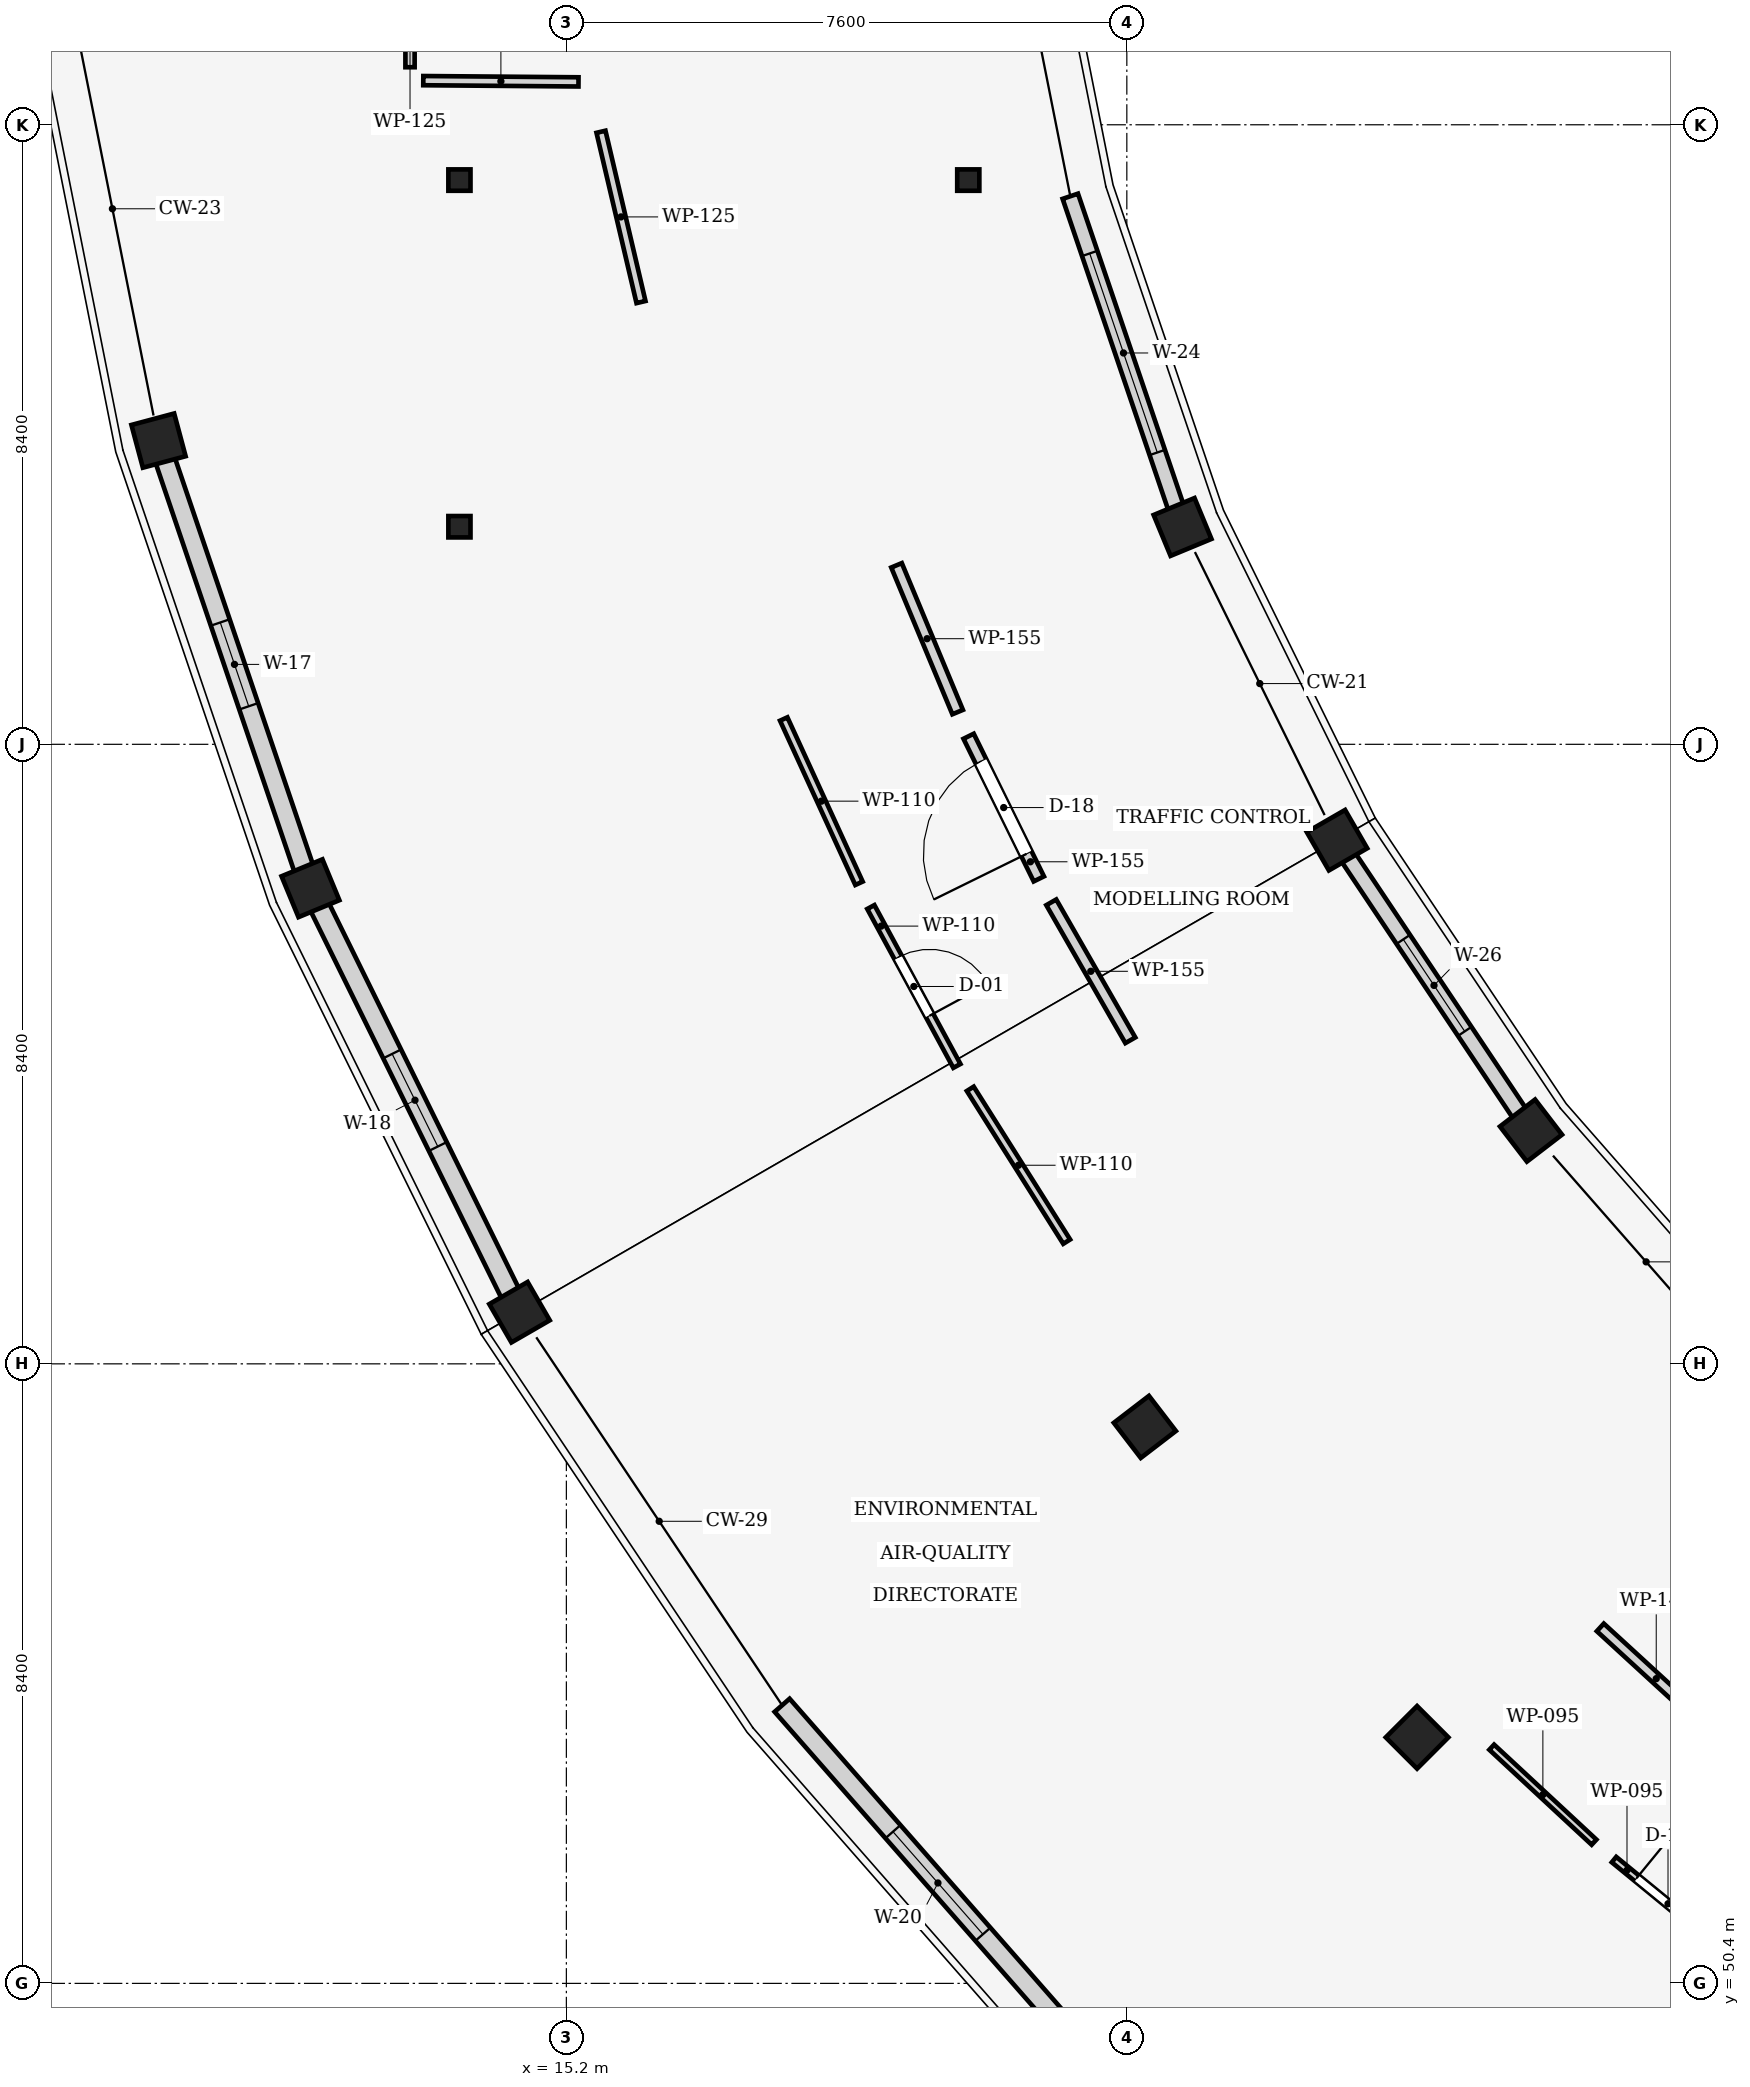
"""IFC4 building model, lengths in metres.
Left out: names, types, materials, properties, quantities, classifications, styles, units other than length and angle.
Written with IfcOpenShell. Run it as: python <this file> out.ifc"""

import sys

from ifc_helpers import new_model, si_unit, direction, frame, frame_2d, origin, origin_2d, place, context, subcontext, project, spatial, rectangle, i_section, extrude, element, fill, save


model = new_model("IFC4")
c1 = context("Model", 3, precision=1e-05, world=origin(), true_north=direction((0.0, 1.0)))
c2 = subcontext(c1, "Body", "Model", "MODEL_VIEW")
j1 = project(units=[si_unit("LENGTHUNIT", "METRE"), si_unit("PLANEANGLEUNIT", "RADIAN")], contexts=[c1])
p1 = place(None, origin())
s1 = spatial("IfcSite", under=j1, at=p1, CompositionType="ELEMENT")
p2 = place(p1, origin())
s2 = spatial("IfcBuilding", under=s1, at=p2, CompositionType="ELEMENT")
p3 = place(p2, frame((0.0, 0.0, 13.2)))
s3 = spatial("IfcBuildingStorey", under=s2, at=p3, CompositionType="ELEMENT", Elevation=13.2)
for number, where, z_axis, x_axis in (
    (1, (9.67, 71.318, 0.0), (0.0, 0.0, 1.0), (-0.966, -0.259, 0.0)),
    (2, (23.556, 70.147, 0.0), (0.0, 0.0, 1.0), (-0.924, -0.383, 0.0)),
    (3, (11.73, 65.249, 0.0), (0.0, 0.0, 1.0), (-0.924, -0.383, 0.0)),
    (4, (25.65, 65.9, 0.0), (0.0, 0.0, 1.0), (-0.866, -0.5, 0.0)),
    (5, (14.565, 59.5, 0.0), (0.0, 0.0, 1.0), (-0.866, -0.5, 0.0)),
    (6, (28.281, 61.963, 0.0), (0.0, 0.0, 1.0), (-0.793, -0.609, 0.0)),
    (7, (23.044, 57.945, 0.0), (0.0, 0.0, 1.0), (-0.793, -0.609, 0.0)),
    (8, (26.736, 53.736, 0.0), (0.0, 0.0, 1.0), (-0.707, -0.707, 0.0)),
):
    element("IfcColumn", number, at=place(p3, frame(where, z_axis=z_axis, x_axis=x_axis)), inside=s3, PredefinedType="COLUMN", context=c2, shape_type="SweptSolid", body=[
        extrude(rectangle(XDim=0.6, YDim=0.6, at=origin_2d()), origin(), (0.0, 0.0, 1.0), 4.05),
    ])
for number, where, z_axis, x_axis in (
    (9, (13.75, 70.15, 0.0), (0.0, 0.0, 1.0), (1.0, 0.0, 0.0)),
    (10, (20.65, 74.85, 0.0), (0.0, 0.0, 1.0), (1.0, 0.0, 0.0)),
    (11, (13.75, 74.85, 0.0), (0.0, 0.0, 1.0), (1.0, 0.0, 0.0)),
):
    element("IfcColumn", number, at=place(p3, frame(where, z_axis=z_axis, x_axis=x_axis)), inside=s3, PredefinedType="COLUMN", context=c2, shape_type="SweptSolid", body=[
        extrude(i_section(OverallWidth=0.3, OverallDepth=0.29, WebThickness=0.009, FlangeThickness=0.014, at=origin_2d()), origin(), (0.0, 0.0, 1.0), 4.05),
    ])
p4 = place(p3, frame((11.65, 65.483, 0.0), z_axis=(0.0, 0.0, 1.0), x_axis=(-0.321412703871, 0.946939213356, 0.0)))
e12 = element("IfcWall", 12, at=p4, inside=s3, PredefinedType="STANDARD", context=c2, shape_type="SweptSolid", body=[
    extrude(rectangle(XDim=5.913, YDim=0.27, at=frame_2d((2.957, 0.0))), origin(), (0.0, 0.0, 1.0), 3.165),
])
p5 = place(p4, frame((2.357, 0.0, 0.85)))
e13 = element("IfcOpeningElement", 13, at=p5, cuts=e12, PredefinedType="OPENING", context=c2, shape_type="SweptSolid", body=[
    extrude(rectangle(XDim=1.2, YDim=1.65, at=frame_2d((0.6, 0.825))), frame((0.0, 0.145, 0.0), z_axis=(0.0, -1.0, 0.0), x_axis=(1.0, 0.0, 0.0)), (0.0, 0.0, 1.0), 0.29),
])
p6 = place(p3, frame((22.033, 74.631, 0.0), z_axis=(0.0, 0.0, 1.0), x_axis=(0.321446201736, -0.946927842758, 0.0)))
e14 = element("IfcWall", 14, at=p6, inside=s3, PredefinedType="STANDARD", context=c2, shape_type="SweptSolid", body=[
    extrude(rectangle(XDim=4.487, YDim=0.22, at=frame_2d((2.244, 0.0))), origin(), (0.0, 0.0, 1.0), 3.7),
])
p7 = place(p6, frame((0.819, 0.0, 0.85)))
e15 = element("IfcOpeningElement", 15, at=p7, cuts=e14, PredefinedType="OPENING", context=c2, shape_type="SweptSolid", body=[
    extrude(rectangle(XDim=2.85, YDim=1.65, at=frame_2d((1.425, 0.825))), frame((0.0, 0.12, 0.0), z_axis=(0.0, -1.0, 0.0), x_axis=(1.0, 0.0, 0.0)), (0.0, 0.0, 1.0), 0.24),
])
p8 = place(p3, frame((14.449, 59.735, 0.0), z_axis=(0.0, 0.0, 1.0), x_axis=(-0.442328593944, 0.89685306209, 0.0)))
e16 = element("IfcWall", 16, at=p8, inside=s3, PredefinedType="STANDARD", context=c2, shape_type="SweptSolid", body=[
    extrude(rectangle(XDim=5.885, YDim=0.27, at=frame_2d((2.943, 0.0))), origin(), (0.0, 0.0, 1.0), 3.165),
])
p9 = place(p8, frame((2.243, 0.0, 0.85)))
e17 = element("IfcOpeningElement", 17, at=p9, cuts=e16, PredefinedType="OPENING", context=c2, shape_type="SweptSolid", body=[
    extrude(rectangle(XDim=1.4, YDim=1.65, at=frame_2d((0.7, 0.825))), frame((0.0, 0.145, 0.0), z_axis=(0.0, -1.0, 0.0), x_axis=(1.0, 0.0, 0.0)), (0.0, 0.0, 1.0), 0.29),
])
p10 = place(p3, frame((25.807, 65.665, 0.0), z_axis=(0.0, 0.0, 1.0), x_axis=(0.555551087144, -0.831482404849, 0.0)))
e18 = element("IfcWall", 18, at=p10, inside=s3, PredefinedType="STANDARD", context=c2, shape_type="SweptSolid", body=[
    extrude(rectangle(XDim=4.17, YDim=0.22, at=frame_2d((2.085, 0.0))), origin(), (0.0, 0.0, 1.0), 3.015),
])
p11 = place(p10, frame((1.335, 0.0, 0.85)))
e19 = element("IfcOpeningElement", 19, at=p11, cuts=e18, PredefinedType="OPENING", context=c2, shape_type="SweptSolid", body=[
    extrude(rectangle(XDim=1.5, YDim=1.85, at=frame_2d((0.75, 0.925))), frame((0.0, 0.12, 0.0), z_axis=(0.0, -1.0, 0.0), x_axis=(1.0, 0.0, 0.0)), (0.0, 0.0, 1.0), 0.24),
])
p12 = place(p3, frame((22.352, 49.352, 0.0), z_axis=(0.0, 0.0, 1.0), x_axis=(-0.659350951881, 0.751835302612, 0.0)))
e20 = element("IfcWall", 20, at=p12, inside=s3, PredefinedType="STANDARD", context=c2, shape_type="SweptSolid", body=[
    extrude(rectangle(XDim=6.409, YDim=0.27, at=frame_2d((3.205, 0.0))), origin(), (0.0, 0.0, 1.0), 3.7),
])
p13 = place(p12, frame((2.28, 0.0, 0.85)))
e21 = element("IfcOpeningElement", 21, at=p13, cuts=e20, PredefinedType="OPENING", context=c2, shape_type="SweptSolid", body=[
    extrude(rectangle(XDim=1.85, YDim=1.65, at=frame_2d((0.925, 0.825))), frame((0.0, 0.145, 0.0), z_axis=(0.0, -1.0, 0.0), x_axis=(1.0, 0.0, 0.0)), (0.0, 0.0, 1.0), 0.29),
])
p14 = place(p3, frame((13.08, 78.922, 0.0), z_axis=(0.0, 0.0, 1.0), x_axis=(0.0, -1.0, 0.0)))
e22 = element("IfcWall", 22, at=p14, inside=s3, PredefinedType="PARTITIONING", context=c2, shape_type="SweptSolid", body=[
    extrude(rectangle(XDim=2.542, YDim=0.125, at=frame_2d((1.271, 0.0))), origin(), (0.0, 0.0, 1.0), 3.7),
])
p15 = place(p14, frame((0.371, 0.0, 0.0)))
e23 = element("IfcOpeningElement", 23, at=p15, cuts=e22, PredefinedType="OPENING", context=c2, shape_type="SweptSolid", body=[
    extrude(rectangle(XDim=1.8, YDim=2.22, at=frame_2d((0.9, 1.11))), frame((0.0, 0.073, 0.0), z_axis=(0.0, -1.0, 0.0), x_axis=(1.0, 0.0, 0.0)), (0.0, 0.0, 1.0), 0.145),
])
p16 = place(p3, frame((15.365, 76.181, 0.0), z_axis=(0.0, 0.0, 1.0), x_axis=(-0.999967029155, 0.008120381907, 0.0)))
e24 = element("IfcWall", 24, at=p16, inside=s3, PredefinedType="PARTITIONING", context=c2, shape_type="SweptSolid", body=[
    extrude(rectangle(XDim=2.104, YDim=0.125, at=frame_2d((1.052, 0.0))), origin(), (0.0, 0.0, 1.0), 3.7),
])
p17 = place(p3, frame((15.669, 75.505, 0.0), z_axis=(0.0, 0.0, 1.0), x_axis=(0.228683661035, -0.973500787455, 0.0)))
e25 = element("IfcWall", 25, at=p17, inside=s3, PredefinedType="PARTITIONING", context=c2, shape_type="SweptSolid", body=[
    extrude(rectangle(XDim=2.372, YDim=0.125, at=frame_2d((1.186, 0.0))), origin(), (0.0, 0.0, 1.0), 3.7),
])
p18 = place(p3, frame((19.329, 64.994, 0.0), z_axis=(0.0, 0.0, 1.0), x_axis=(0.476231784028, -0.879319787041, 0.0)))
e26 = element("IfcWall", 26, at=p18, inside=s3, PredefinedType="PARTITIONING", context=c2, shape_type="SweptSolid", body=[
    extrude(rectangle(XDim=2.45, YDim=0.11, at=frame_2d((1.225, 0.0))), origin(), (0.0, 0.0, 1.0), 3.7),
])
p19 = place(p18, frame((0.775, 0.0, 0.0)))
e27 = element("IfcOpeningElement", 27, at=p19, cuts=e26, PredefinedType="OPENING", context=c2, shape_type="SweptSolid", body=[
    extrude(rectangle(XDim=0.9, YDim=2.1, at=frame_2d((0.45, 1.05))), frame((0.0, 0.065, 0.0), z_axis=(0.0, -1.0, 0.0), x_axis=(1.0, 0.0, 0.0)), (0.0, 0.0, 1.0), 0.13),
])
for number, where, z_axis, x_axis in (
    (28, (18.147, 67.543, 0.0), (0.0, 0.0, 1.0), (0.417, -0.909, 0.0)),
    (29, (20.677, 62.529, 0.0), (0.0, 0.0, 1.0), (0.534, -0.846, 0.0)),
):
    element("IfcWall", number, at=place(p3, frame(where, z_axis=z_axis, x_axis=x_axis)), inside=s3, PredefinedType="PARTITIONING", context=c2, shape_type="SweptSolid", body=[
        extrude(rectangle(XDim=2.45, YDim=0.11, at=frame_2d((1.225, 0.0))), origin(), (0.0, 0.0, 1.0), 3.7),
    ])
p20 = place(p3, frame((29.406, 52.078, 0.0), z_axis=(0.0, 0.0, 1.0), x_axis=(0.773784863967, -0.633448485905, 0.0)))
e30 = element("IfcWall", 30, at=p20, inside=s3, PredefinedType="PARTITIONING", context=c2, shape_type="SweptSolid", body=[
    extrude(rectangle(XDim=1.893, YDim=0.095, at=frame_2d((0.946, 0.0))), origin(), (0.0, 0.0, 1.0), 3.7),
])
p21 = place(p20, frame((0.396, 0.0, 0.0)))
e31 = element("IfcOpeningElement", 31, at=p21, cuts=e30, PredefinedType="OPENING", context=c2, shape_type="SweptSolid", body=[
    extrude(rectangle(XDim=1.1, YDim=2.35, at=frame_2d((0.55, 1.175))), frame((0.0, 0.057, 0.0), z_axis=(0.0, -1.0, 0.0), x_axis=(1.0, 0.0, 0.0)), (0.0, 0.0, 1.0), 0.115),
])
p22 = place(p3, frame((27.748, 53.602, 0.0), z_axis=(0.0, 0.0, 1.0), x_axis=(0.73299099387, -0.680238342719, 0.0)))
e32 = element("IfcWall", 32, at=p22, inside=s3, PredefinedType="PARTITIONING", context=c2, shape_type="SweptSolid", body=[
    extrude(rectangle(XDim=1.893, YDim=0.095, at=frame_2d((0.946, 0.0))), origin(), (0.0, 0.0, 1.0), 3.7),
])
p23 = place(p3, frame((21.606, 65.375, 0.0), z_axis=(0.0, 0.0, 1.0), x_axis=(-0.441632126949, 0.897196224048, 0.0)))
e33 = element("IfcWall", 33, at=p23, inside=s3, PredefinedType="PARTITIONING", context=c2, shape_type="SweptSolid", body=[
    extrude(rectangle(XDim=2.156, YDim=0.155, at=frame_2d((1.078, 0.0))), origin(), (0.0, 0.0, 1.0), 3.7),
])
p24 = place(p23, frame((0.378, 0.0, 0.0)))
e34 = element("IfcOpeningElement", 34, at=p24, cuts=e33, PredefinedType="OPENING", context=c2, shape_type="SweptSolid", body=[
    extrude(rectangle(XDim=1.4, YDim=2.35, at=frame_2d((0.7, 1.175))), frame((0.0, 0.087, 0.0), z_axis=(0.0, -1.0, 0.0), x_axis=(1.0, 0.0, 0.0)), (0.0, 0.0, 1.0), 0.175),
])
p25 = place(p3, frame((22.847, 63.187, 0.0), z_axis=(0.0, 0.0, 1.0), x_axis=(-0.497272739053, 0.867594273261, 0.0)))
e35 = element("IfcWall", 35, at=p25, inside=s3, PredefinedType="PARTITIONING", context=c2, shape_type="SweptSolid", body=[
    extrude(rectangle(XDim=2.156, YDim=0.155, at=frame_2d((1.078, 0.0))), origin(), (0.0, 0.0, 1.0), 3.7),
])
p26 = place(p3, frame((20.506, 67.637, 0.0), z_axis=(0.0, 0.0, 1.0), x_axis=(-0.384398239962, 0.923167370044, 0.0)))
e36 = element("IfcWall", 36, at=p26, inside=s3, PredefinedType="PARTITIONING", context=c2, shape_type="SweptSolid", body=[
    extrude(rectangle(XDim=2.156, YDim=0.155, at=frame_2d((1.078, 0.0))), origin(), (0.0, 0.0, 1.0), 3.7),
])
p27 = place(p3, frame((30.737, 53.836, 0.0), z_axis=(0.0, 0.0, 1.0), x_axis=(-0.737006331673, 0.675885838788, 0.0)))
e37 = element("IfcWall", 37, at=p27, inside=s3, PredefinedType="PARTITIONING", context=c2, shape_type="SweptSolid", body=[
    extrude(rectangle(XDim=2.057, YDim=0.14, at=frame_2d((1.029, 0.0))), origin(), (0.0, 0.0, 1.0), 3.7),
])
p28 = place(p5, origin())
e38 = element("IfcWindow", 38, at=p28, inside=s3, PartitioningType="SINGLE_PANEL", PredefinedType="WINDOW", context=c2, shape_type="SweptSolid", body=[
    extrude(rectangle(XDim=1.2, YDim=1.65, at=frame_2d((0.6, 0.825))), frame((0.0, 0.03, 0.0), z_axis=(0.0, -1.0, 0.0), x_axis=(1.0, 0.0, 0.0)), (0.0, 0.0, 1.0), 0.06),
])
fill(e13, e38)
p29 = place(p7, origin())
e39 = element("IfcWindow", 39, at=p29, inside=s3, PartitioningType="SINGLE_PANEL", PredefinedType="WINDOW", context=c2, shape_type="SweptSolid", body=[
    extrude(rectangle(XDim=2.85, YDim=1.65, at=frame_2d((1.425, 0.825))), frame((0.0, 0.03, 0.0), z_axis=(0.0, -1.0, 0.0), x_axis=(1.0, 0.0, 0.0)), (0.0, 0.0, 1.0), 0.06),
])
fill(e15, e39)
p30 = place(p9, origin())
e40 = element("IfcWindow", 40, at=p30, inside=s3, PartitioningType="SINGLE_PANEL", PredefinedType="WINDOW", context=c2, shape_type="SweptSolid", body=[
    extrude(rectangle(XDim=1.4, YDim=1.65, at=frame_2d((0.7, 0.825))), frame((0.0, 0.03, 0.0), z_axis=(0.0, -1.0, 0.0), x_axis=(1.0, 0.0, 0.0)), (0.0, 0.0, 1.0), 0.06),
])
fill(e17, e40)
p31 = place(p11, origin())
e41 = element("IfcWindow", 41, at=p31, inside=s3, PartitioningType="SINGLE_PANEL", PredefinedType="WINDOW", context=c2, shape_type="SweptSolid", body=[
    extrude(rectangle(XDim=1.5, YDim=1.85, at=frame_2d((0.75, 0.925))), frame((0.0, 0.03, 0.0), z_axis=(0.0, -1.0, 0.0), x_axis=(1.0, 0.0, 0.0)), (0.0, 0.0, 1.0), 0.06),
])
fill(e19, e41)
p32 = place(p13, origin())
e42 = element("IfcWindow", 42, at=p32, inside=s3, PartitioningType="SINGLE_PANEL", PredefinedType="WINDOW", context=c2, shape_type="SweptSolid", body=[
    extrude(rectangle(XDim=1.85, YDim=1.65, at=frame_2d((0.925, 0.825))), frame((0.0, 0.03, 0.0), z_axis=(0.0, -1.0, 0.0), x_axis=(1.0, 0.0, 0.0)), (0.0, 0.0, 1.0), 0.06),
])
fill(e21, e42)
p33 = place(p19, origin())
e43 = element("IfcDoor", 43, at=p33, inside=s3, OperationType="SINGLE_SWING_RIGHT", PredefinedType="DOOR", context=c2, shape_type="SweptSolid", body=[
    extrude(rectangle(XDim=0.9, YDim=2.1, at=frame_2d((0.45, 1.05))), frame((0.0, 0.025, 0.0), z_axis=(0.0, -1.0, 0.0), x_axis=(1.0, 0.0, 0.0)), (0.0, 0.0, 1.0), 0.05),
])
fill(e27, e43)
p34 = place(p21, origin())
e44 = element("IfcDoor", 44, at=p34, inside=s3, OperationType="SINGLE_SWING_LEFT", PredefinedType="DOOR", context=c2, shape_type="SweptSolid", body=[
    extrude(rectangle(XDim=1.1, YDim=2.35, at=frame_2d((0.55, 1.175))), frame((0.0, 0.025, 0.0), z_axis=(0.0, -1.0, 0.0), x_axis=(1.0, 0.0, 0.0)), (0.0, 0.0, 1.0), 0.05),
])
fill(e31, e44)
p35 = place(p24, origin())
e45 = element("IfcDoor", 45, at=p35, inside=s3, OperationType="SINGLE_SWING_LEFT", PredefinedType="DOOR", context=c2, shape_type="SweptSolid", body=[
    extrude(rectangle(XDim=1.4, YDim=2.35, at=frame_2d((0.7, 1.175))), frame((0.0, 0.025, 0.0), z_axis=(0.0, -1.0, 0.0), x_axis=(1.0, 0.0, 0.0)), (0.0, 0.0, 1.0), 0.05),
])
fill(e34, e45)
save(model, sys.argv[1])
